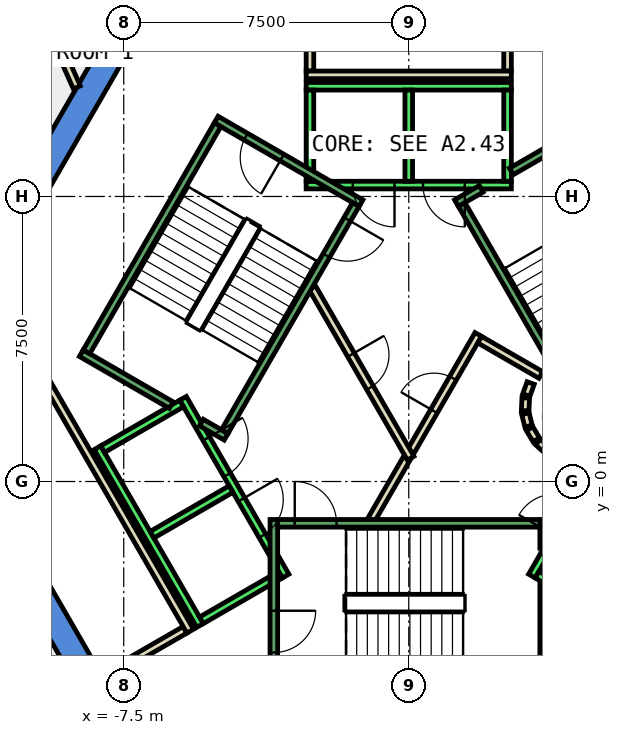
"""IFC4 building model, lengths in metres.
Left out: names, types, materials, properties, quantities, classifications, styles, units other than length and angle.
Written with IfcOpenShell. Run it as: python <this file> out.ifc"""

import sys

from ifc_helpers import new_model, si_unit, direction, frame, frame_2d, origin, place, context, subcontext, project, spatial, polyline, rectangle, outline, extrude, element, fill, save


model = new_model("IFC4")
c1 = context("Model", 3, precision=1e-05, world=origin(), true_north=direction((0.0, 1.0)))
c2 = subcontext(c1, "Body", "Model", "MODEL_VIEW")
j1 = project(units=[si_unit("LENGTHUNIT", "METRE"), si_unit("PLANEANGLEUNIT", "RADIAN")], contexts=[c1])
p1 = place(None, origin())
s1 = spatial("IfcSite", under=j1, at=p1, CompositionType="ELEMENT")
p2 = place(p1, origin())
s2 = spatial("IfcBuilding", under=s1, at=p2, CompositionType="ELEMENT")
p3 = place(p2, frame((0.0, 0.0, 210.8)))
s3 = spatial("IfcBuildingStorey", under=s2, at=p3, CompositionType="ELEMENT", Elevation=210.8)
p4 = place(p3, frame((0.0, 0.0, -0.4)))
e1 = element("IfcWall", 1, at=p4, inside=s3, PredefinedType="SHEAR", context=c2, shape_type="SweptSolid", body=[
    extrude(outline(polyline([(-11.834, 5.002), (-11.228, 4.652), (-6.235, 13.3), (-6.64, 14.0), (-11.834, 5.002)])), origin(), (0.0, 0.0, 1.0), 4.2),
])
p5 = place(p3, frame((0.0, 0.0, -0.4)))
e2 = element("IfcWall", 2, at=p5, inside=s3, PredefinedType="SHEAR", context=c2, shape_type="SweptSolid", body=[
    extrude(outline(polyline([(-13.279, 2.5), (-6.64, -9.0), (-6.235, -8.3), (-12.471, 2.5), (-13.279, 2.5)])), origin(), (0.0, 0.0, 1.0), 4.2),
])
p6 = place(p3, frame((-9.47, 12.033, 0.0), z_axis=(0.0, 0.0, 1.0), x_axis=(0.40441741061, -0.914574522931, 0.0)))
e3 = element("IfcWall", 3, at=p6, inside=s3, PredefinedType="PARTITIONING", context=c2, shape_type="SweptSolid", body=[
    extrude(rectangle(XDim=1.817, YDim=0.2, at=frame_2d((0.909, 0.0))), origin(), (0.0, 0.0, 1.0), 3.8),
])
p7 = place(p3, frame((-2.6, 10.8, 0.0), z_axis=(0.0, 0.0, 1.0), x_axis=(0.0, 1.0, 0.0)))
e4 = element("IfcWall", 4, at=p7, inside=s3, PredefinedType="PARTITIONING", context=c2, shape_type="SweptSolid", body=[
    extrude(rectangle(XDim=2.5, YDim=0.2, at=frame_2d((1.25, 0.0))), origin(), (0.0, 0.0, 1.0), 3.8),
])
p8 = place(p7, frame((0.75, 0.0, 0.0)))
e5 = element("IfcOpeningElement", 5, at=p8, cuts=e4, PredefinedType="OPENING", context=c2, shape_type="SweptSolid", body=[
    extrude(rectangle(XDim=0.9, YDim=2.1, at=frame_2d((0.45, 1.05))), frame((0.0, 0.11, 0.0), z_axis=(0.0, -1.0, 0.0), x_axis=(1.0, 0.0, 0.0)), (0.0, 0.0, 1.0), 0.22),
])
p9 = place(p3, frame((2.6, 13.3, 0.0), z_axis=(0.0, 0.0, 1.0), x_axis=(0.0, -1.0, 0.0)))
e6 = element("IfcWall", 6, at=p9, inside=s3, PredefinedType="PARTITIONING", context=c2, shape_type="SweptSolid", body=[
    extrude(rectangle(XDim=2.5, YDim=0.2, at=frame_2d((1.25, 0.0))), origin(), (0.0, 0.0, 1.0), 3.8),
])
p10 = place(p3, frame((2.7, 10.7, 0.0), z_axis=(0.0, 0.0, 1.0), x_axis=(-1.0, 0.0, 0.0)))
e7 = element("IfcWall", 7, at=p10, inside=s3, PredefinedType="PARTITIONING", context=c2, shape_type="SweptSolid", body=[
    extrude(rectangle(XDim=5.4, YDim=0.2, at=frame_2d((2.7, 0.0))), origin(), (0.0, 0.0, 1.0), 3.8),
])
p11 = place(p3, frame((-5.888, -3.902, 0.0), z_axis=(0.0, 0.0, 1.0), x_axis=(-0.866022959057, -0.500004234368, 0.0)))
e8 = element("IfcWall", 8, at=p11, inside=s3, PredefinedType="PARTITIONING", context=c2, shape_type="SweptSolid", body=[
    extrude(rectangle(XDim=2.5, YDim=0.2, at=frame_2d((1.25, 0.0))), origin(), (0.0, 0.0, 1.0), 3.8),
])
p12 = place(p3, frame((-9.751, 2.99, 0.0), z_axis=(0.0, 0.0, 1.0), x_axis=(0.500012163284, -0.866018381195, 0.0)))
e9 = element("IfcWall", 9, at=p12, inside=s3, PredefinedType="PARTITIONING", context=c2, shape_type="SweptSolid", body=[
    extrude(rectangle(XDim=8.0, YDim=0.2, at=frame_2d((4.0, 0.0))), origin(), (0.0, 0.0, 1.0), 3.8),
])
p13 = place(p3, frame((-0.982, -1.0, 0.0), z_axis=(0.0, 0.0, 1.0), x_axis=(0.50024047865, 0.865886518847, 0.0)))
e10 = element("IfcWall", 10, at=p13, inside=s3, PredefinedType="PARTITIONING", context=c2, shape_type="SweptSolid", body=[
    extrude(rectangle(XDim=1.863, YDim=0.2, at=frame_2d((0.931, 0.0))), origin(), (0.0, 0.0, 1.0), 3.8),
])
p14 = place(p3, frame((0.05, 0.787, 0.0), z_axis=(0.0, 0.0, 1.0), x_axis=(0.499954076797, 0.866051915934, 0.0)))
e11 = element("IfcWall", 11, at=p14, inside=s3, PredefinedType="PARTITIONING", context=c2, shape_type="SweptSolid", body=[
    extrude(rectangle(XDim=3.558, YDim=0.2, at=frame_2d((1.779, 0.0))), origin(), (0.0, 0.0, 1.0), 3.8),
])
p15 = place(p14, frame((1.229, 0.0, 0.0)))
e12 = element("IfcOpeningElement", 12, at=p15, cuts=e11, PredefinedType="OPENING", context=c2, shape_type="SweptSolid", body=[
    extrude(rectangle(XDim=1.0, YDim=2.1, at=frame_2d((0.5, 1.05))), frame((0.0, 0.11, 0.0), z_axis=(0.0, -1.0, 0.0), x_axis=(1.0, 0.0, 0.0)), (0.0, 0.0, 1.0), 0.22),
])
p16 = place(p3, frame((1.866, 3.732, 0.0), z_axis=(0.0, 0.0, 1.0), x_axis=(0.866043361281, -0.499968895414, 0.0)))
e13 = element("IfcWall", 13, at=p16, inside=s3, PredefinedType="PARTITIONING", context=c2, shape_type="SweptSolid", body=[
    extrude(rectangle(XDim=1.858, YDim=0.2, at=frame_2d((0.929, 0.0))), origin(), (0.0, 0.0, 1.0), 3.8),
])
p17 = place(p3, frame((3.208, 2.592, 0.0), z_axis=(0.0, 0.0, 1.0), x_axis=(-0.337388820924, -0.941365382578, 0.0)))
e14 = element("IfcWall", 14, at=p17, inside=s3, PredefinedType="PARTITIONING", context=c2, shape_type="SweptSolid", body=[
    extrude(rectangle(XDim=0.338, YDim=0.2, at=frame_2d((0.169, 0.0))), origin(), (0.0, 0.0, 1.0), 3.8),
])
p18 = place(p3, frame((3.079, 2.199, 0.0), z_axis=(0.0, 0.0, 1.0), x_axis=(-0.047771483479, -0.998858290933, 0.0)))
e15 = element("IfcWall", 15, at=p18, inside=s3, PredefinedType="PARTITIONING", context=c2, shape_type="SweptSolid", body=[
    extrude(rectangle(XDim=0.337, YDim=0.2, at=frame_2d((0.169, 0.0))), origin(), (0.0, 0.0, 1.0), 3.8),
])
p19 = place(p3, frame((3.07, 1.786, 0.0), z_axis=(0.0, 0.0, 1.0), x_axis=(0.242705583207, -0.970099994784, 0.0)))
e16 = element("IfcWall", 16, at=p19, inside=s3, PredefinedType="PARTITIONING", context=c2, shape_type="SweptSolid", body=[
    extrude(rectangle(XDim=0.338, YDim=0.2, at=frame_2d((0.169, 0.0))), origin(), (0.0, 0.0, 1.0), 3.8),
])
for number, where, z_axis, x_axis in (
    (17, (3.182, 1.388, 0.0), (0.0, 0.0, 1.0), (0.512, -0.859, 0.0)),
    (18, (3.404, 1.039, 0.0), (0.0, 0.0, 1.0), (0.74, -0.672, 0.0)),
):
    element("IfcWall", number, at=place(p3, frame(where, z_axis=z_axis, x_axis=x_axis)), inside=s3, PredefinedType="PARTITIONING", context=c2, shape_type="SweptSolid", body=[
        extrude(rectangle(XDim=0.338, YDim=0.2, at=frame_2d((0.169, 0.0))), origin(), (0.0, 0.0, 1.0), 3.8),
    ])
p20 = place(p3, frame((-2.54, 5.1, 0.0), z_axis=(0.0, 0.0, 1.0), x_axis=(0.499925051871, -0.866068670783, 0.0)))
e19 = element("IfcWall", 19, at=p20, inside=s3, PredefinedType="PARTITIONING", context=c2, shape_type="SweptSolid", body=[
    extrude(rectangle(XDim=5.181, YDim=0.2, at=frame_2d((2.59, 0.0))), origin(), (0.0, 0.0, 1.0), 3.8),
])
p21 = place(p20, frame((2.04, 0.0, 0.0)))
e20 = element("IfcOpeningElement", 20, at=p21, cuts=e19, PredefinedType="OPENING", context=c2, shape_type="SweptSolid", body=[
    extrude(rectangle(XDim=1.0, YDim=2.1, at=frame_2d((0.5, 1.05))), frame((0.0, 0.11, 0.0), z_axis=(0.0, -1.0, 0.0), x_axis=(1.0, 0.0, 0.0)), (0.0, 0.0, 1.0), 0.22),
])
p22 = place(p3, frame((2.7, 7.8, 0.0), z_axis=(0.0, 0.0, 1.0), x_axis=(-1.0, 0.0, 0.0)))
e21 = element("IfcWall", 21, at=p22, inside=s3, PredefinedType="STANDARD", context=c2, shape_type="SweptSolid", body=[
    extrude(rectangle(XDim=5.4, YDim=0.2, at=frame_2d((2.7, 0.0))), origin(), (0.0, 0.0, 1.0), 3.8),
])
p23 = place(p22, frame((1.225, 0.0, 0.0)))
e22 = element("IfcOpeningElement", 22, at=p23, cuts=e21, PredefinedType="OPENING", context=c2, shape_type="SweptSolid", body=[
    extrude(rectangle(XDim=1.1, YDim=2.1, at=frame_2d((0.55, 1.05))), frame((0.0, 0.11, 0.0), z_axis=(0.0, -1.0, 0.0), x_axis=(1.0, 0.0, 0.0)), (0.0, 0.0, 1.0), 0.22),
])
p24 = place(p22, frame((3.075, 0.0, 0.0)))
e23 = element("IfcOpeningElement", 23, at=p24, cuts=e21, PredefinedType="OPENING", context=c2, shape_type="SweptSolid", body=[
    extrude(rectangle(XDim=1.1, YDim=2.1, at=frame_2d((0.55, 1.05))), frame((0.0, 0.11, 0.0), z_axis=(0.0, -1.0, 0.0), x_axis=(1.0, 0.0, 0.0)), (0.0, 0.0, 1.0), 0.22),
])
p25 = place(p3, frame((2.7, 10.4, 0.0), z_axis=(0.0, 0.0, 1.0), x_axis=(-1.0, 0.0, 0.0)))
e24 = element("IfcWall", 24, at=p25, inside=s3, PredefinedType="STANDARD", context=c2, shape_type="SweptSolid", body=[
    extrude(rectangle(XDim=5.4, YDim=0.2, at=frame_2d((2.7, 0.0))), origin(), (0.0, 0.0, 1.0), 3.8),
])
for number, where, z_axis, x_axis in (
    (25, (2.6, 7.9, 0.0), (0.0, 0.0, 1.0), (0.0, 1.0, 0.0)),
    (26, (0.0, 7.9, 0.0), (0.0, 0.0, 1.0), (0.0, 1.0, 0.0)),
    (27, (-2.6, 7.9, 0.0), (0.0, 0.0, 1.0), (0.0, 1.0, 0.0)),
):
    element("IfcWall", number, at=place(p3, frame(where, z_axis=z_axis, x_axis=x_axis)), inside=s3, PredefinedType="STANDARD", context=c2, shape_type="SweptSolid", body=[
        extrude(rectangle(XDim=2.4, YDim=0.2, at=frame_2d((1.2, 0.0))), origin(), (0.0, 0.0, 1.0), 3.8),
    ])
p26 = place(p3, frame((-5.94, 2.188, 0.0), z_axis=(0.0, 0.0, 1.0), x_axis=(0.500034260056, -0.866005622828, 0.0)))
e28 = element("IfcWall", 28, at=p26, inside=s3, PredefinedType="STANDARD", context=c2, shape_type="SweptSolid", body=[
    extrude(rectangle(XDim=5.399, YDim=0.2, at=frame_2d((2.7, 0.0))), origin(), (0.0, 0.0, 1.0), 3.8),
])
p27 = place(p26, frame((3.075, 0.0, 0.0)))
e29 = element("IfcOpeningElement", 29, at=p27, cuts=e28, PredefinedType="OPENING", context=c2, shape_type="SweptSolid", body=[
    extrude(rectangle(XDim=1.1, YDim=2.1, at=frame_2d((0.55, 1.05))), frame((0.0, 0.11, 0.0), z_axis=(0.0, -1.0, 0.0), x_axis=(1.0, 0.0, 0.0)), (0.0, 0.0, 1.0), 0.22),
])
p28 = place(p26, frame((1.225, 0.0, 0.0)))
e30 = element("IfcOpeningElement", 30, at=p28, cuts=e28, PredefinedType="OPENING", context=c2, shape_type="SweptSolid", body=[
    extrude(rectangle(XDim=1.1, YDim=2.1, at=frame_2d((0.55, 1.05))), frame((0.0, 0.11, 0.0), z_axis=(0.0, -1.0, 0.0), x_axis=(1.0, 0.0, 0.0)), (0.0, 0.0, 1.0), 0.22),
])
p29 = place(p3, frame((-8.192, 0.888, 0.0), z_axis=(0.0, 0.0, 1.0), x_axis=(0.500034260056, -0.866005622828, 0.0)))
e31 = element("IfcWall", 31, at=p29, inside=s3, PredefinedType="STANDARD", context=c2, shape_type="SweptSolid", body=[
    extrude(rectangle(XDim=5.399, YDim=0.2, at=frame_2d((2.7, 0.0))), origin(), (0.0, 0.0, 1.0), 3.8),
])
for number, where, z_axis, x_axis in (
    (32, (-5.977, 2.052, 0.0), (0.0, 0.0, 1.0), (-0.866, -0.5, 0.0)),
    (33, (-4.677, -0.2, 0.0), (0.0, 0.0, 1.0), (-0.866, -0.5, 0.0)),
):
    element("IfcWall", number, at=place(p3, frame(where, z_axis=z_axis, x_axis=x_axis)), inside=s3, PredefinedType="STANDARD", context=c2, shape_type="SweptSolid", body=[
        extrude(rectangle(XDim=2.399, YDim=0.2, at=frame_2d((1.2, 0.0))), origin(), (0.0, 0.0, 1.0), 3.8),
    ])
p30 = place(p3, frame((-3.377, -2.452, 0.0), z_axis=(0.0, 0.0, 1.0), x_axis=(-0.865955154139, -0.50012165622, 0.0)))
e34 = element("IfcWall", 34, at=p30, inside=s3, PredefinedType="STANDARD", context=c2, shape_type="SweptSolid", body=[
    extrude(rectangle(XDim=2.4, YDim=0.2, at=frame_2d((1.2, 0.0))), origin(), (0.0, 0.0, 1.0), 3.8),
])
p31 = place(p3, frame((3.24, -2.488, 0.0), z_axis=(0.0, 0.0, 1.0), x_axis=(0.500034260056, 0.866005622828, 0.0)))
e35 = element("IfcWall", 35, at=p31, inside=s3, PredefinedType="STANDARD", context=c2, shape_type="SweptSolid", body=[
    extrude(rectangle(XDim=5.399, YDim=0.2, at=frame_2d((2.7, 0.0))), origin(), (0.0, 0.0, 1.0), 3.8),
])
p32 = place(p31, frame((3.225, 0.0, 0.0)))
e36 = element("IfcOpeningElement", 36, at=p32, cuts=e35, PredefinedType="OPENING", context=c2, shape_type="SweptSolid", body=[
    extrude(rectangle(XDim=1.1, YDim=2.1, at=frame_2d((0.55, 1.05))), frame((0.0, 0.11, 0.0), z_axis=(0.0, -1.0, 0.0), x_axis=(1.0, 0.0, 0.0)), (0.0, 0.0, 1.0), 0.22),
])
p33 = place(p31, frame((1.225, 0.0, 0.0)))
e37 = element("IfcOpeningElement", 37, at=p33, cuts=e35, PredefinedType="OPENING", context=c2, shape_type="SweptSolid", body=[
    extrude(rectangle(XDim=1.1, YDim=2.1, at=frame_2d((0.55, 1.05))), frame((0.0, 0.11, 0.0), z_axis=(0.0, -1.0, 0.0), x_axis=(1.0, 0.0, 0.0)), (0.0, 0.0, 1.0), 0.22),
])
p34 = place(p3, frame((3.377, -2.452, 0.0), z_axis=(0.0, 0.0, 1.0), x_axis=(0.865955154139, -0.50012165622, 0.0)))
e38 = element("IfcWall", 38, at=p34, inside=s3, PredefinedType="STANDARD", context=c2, shape_type="SweptSolid", body=[
    extrude(rectangle(XDim=2.4, YDim=0.2, at=frame_2d((1.2, 0.0))), origin(), (0.0, 0.0, 1.0), 3.8),
])
p35 = place(p3, frame((-3.55, -1.0, 0.0), z_axis=(0.0, 0.0, 1.0), x_axis=(0.0, -1.0, 0.0)))
e39 = element("IfcWall", 39, at=p35, inside=s3, PredefinedType="STANDARD", context=c2, shape_type="SweptSolid", body=[
    extrude(rectangle(XDim=4.4, YDim=0.2, at=frame_2d((2.2, 0.0))), origin(), (0.0, 0.0, 1.0), 3.8),
])
p36 = place(p35, frame((2.4, 0.0, 0.0)))
e40 = element("IfcOpeningElement", 40, at=p36, cuts=e39, PredefinedType="OPENING", context=c2, shape_type="SweptSolid", body=[
    extrude(rectangle(XDim=1.1, YDim=2.2, at=frame_2d((0.55, 1.1))), frame((0.0, 0.11, 0.0), z_axis=(0.0, -1.0, 0.0), x_axis=(1.0, 0.0, 0.0)), (0.0, 0.0, 1.0), 0.22),
])
p37 = place(p3, frame((3.55, -2.667, 0.0), z_axis=(0.0, 0.0, 1.0), x_axis=(0.0, -1.0, 0.0)))
e41 = element("IfcWall", 41, at=p37, inside=s3, PredefinedType="STANDARD", context=c2, shape_type="SweptSolid", body=[
    extrude(rectangle(XDim=2.733, YDim=0.2, at=frame_2d((1.366, 0.0))), origin(), (0.0, 0.0, 1.0), 3.8),
])
p38 = place(p3, frame((3.55, -1.0, 0.0), z_axis=(0.0, 0.0, 1.0), x_axis=(0.0, -1.0, 0.0)))
e42 = element("IfcWall", 42, at=p38, inside=s3, PredefinedType="STANDARD", context=c2, shape_type="SweptSolid", body=[
    extrude(rectangle(XDim=0.751, YDim=0.2, at=frame_2d((0.375, 0.0))), origin(), (0.0, 0.0, 1.0), 3.8),
])
p39 = place(p3, frame((-3.45, -1.1, 0.0), z_axis=(0.0, 0.0, 1.0), x_axis=(1.0, 0.0, 0.0)))
e43 = element("IfcWall", 43, at=p39, inside=s3, PredefinedType="STANDARD", context=c2, shape_type="SweptSolid", body=[
    extrude(rectangle(XDim=6.9, YDim=0.2, at=frame_2d((3.45, 0.0))), origin(), (0.0, 0.0, 1.0), 3.8),
])
p40 = place(p39, frame((0.45, 0.0, 0.0)))
e44 = element("IfcOpeningElement", 44, at=p40, cuts=e43, PredefinedType="OPENING", context=c2, shape_type="SweptSolid", body=[
    extrude(rectangle(XDim=1.1, YDim=2.2, at=frame_2d((0.55, 1.1))), frame((0.0, 0.11, 0.0), z_axis=(0.0, -1.0, 0.0), x_axis=(1.0, 0.0, 0.0)), (0.0, 0.0, 1.0), 0.22),
])
p41 = place(p3, frame((2.7, 8.158, 0.0), z_axis=(0.0, 0.0, 1.0), x_axis=(0.86611865017, 0.499838457731, 0.0)))
e45 = element("IfcWall", 45, at=p41, inside=s3, PredefinedType="STANDARD", context=c2, shape_type="SweptSolid", body=[
    extrude(rectangle(XDim=2.733, YDim=0.2, at=frame_2d((1.366, 0.0))), origin(), (0.0, 0.0, 1.0), 3.8),
])
p42 = place(p3, frame((1.256, 7.324, 0.0), z_axis=(0.0, 0.0, 1.0), x_axis=(0.865915093549, 0.500191014278, 0.0)))
e46 = element("IfcWall", 46, at=p42, inside=s3, PredefinedType="STANDARD", context=c2, shape_type="SweptSolid", body=[
    extrude(rectangle(XDim=0.752, YDim=0.2, at=frame_2d((0.376, 0.0))), origin(), (0.0, 0.0, 1.0), 3.8),
])
p43 = place(p3, frame((4.843, 1.312, 0.0), z_axis=(0.0, 0.0, 1.0), x_axis=(-0.499963383562, 0.866046543262, 0.0)))
e47 = element("IfcWall", 47, at=p43, inside=s3, PredefinedType="STANDARD", context=c2, shape_type="SweptSolid", body=[
    extrude(rectangle(XDim=6.9, YDim=0.2, at=frame_2d((3.45, 0.0))), origin(), (0.0, 0.0, 1.0), 3.8),
])
p44 = place(p43, frame((0.45, 0.0, 0.0)))
e48 = element("IfcOpeningElement", 48, at=p44, cuts=e47, PredefinedType="OPENING", context=c2, shape_type="SweptSolid", body=[
    extrude(rectangle(XDim=1.1, YDim=2.2, at=frame_2d((0.55, 1.1))), frame((0.0, 0.11, 0.0), z_axis=(0.0, -1.0, 0.0), x_axis=(1.0, 0.0, 0.0)), (0.0, 0.0, 1.0), 0.22),
])
p45 = place(p3, frame((-1.256, 7.324, 0.0), z_axis=(0.0, 0.0, 1.0), x_axis=(-0.866046073146, 0.499964197906, 0.0)))
e49 = element("IfcWall", 49, at=p45, inside=s3, PredefinedType="STANDARD", context=c2, shape_type="SweptSolid", body=[
    extrude(rectangle(XDim=4.4, YDim=0.2, at=frame_2d((2.2, 0.0))), origin(), (0.0, 0.0, 1.0), 3.8),
])
p46 = place(p45, frame((2.4, 0.0, 0.0)))
e50 = element("IfcOpeningElement", 50, at=p46, cuts=e49, PredefinedType="OPENING", context=c2, shape_type="SweptSolid", body=[
    extrude(rectangle(XDim=1.1, YDim=2.2, at=frame_2d((0.55, 1.1))), frame((0.0, 0.11, 0.0), z_axis=(0.0, -1.0, 0.0), x_axis=(1.0, 0.0, 0.0)), (0.0, 0.0, 1.0), 0.22),
])
p47 = place(p3, frame((-6.25, 2.01, 0.0), z_axis=(0.0, 0.0, 1.0), x_axis=(-0.86611865017, 0.499838457731, 0.0)))
e51 = element("IfcWall", 51, at=p47, inside=s3, PredefinedType="STANDARD", context=c2, shape_type="SweptSolid", body=[
    extrude(rectangle(XDim=2.733, YDim=0.2, at=frame_2d((1.366, 0.0))), origin(), (0.0, 0.0, 1.0), 3.8),
])
p48 = place(p3, frame((-4.806, 1.176, 0.0), z_axis=(0.0, 0.0, 1.0), x_axis=(-0.866558586415, 0.499075361355, 0.0)))
e52 = element("IfcWall", 52, at=p48, inside=s3, PredefinedType="STANDARD", context=c2, shape_type="SweptSolid", body=[
    extrude(rectangle(XDim=0.751, YDim=0.2, at=frame_2d((0.376, 0.0))), origin(), (0.0, 0.0, 1.0), 3.8),
])
p49 = place(p3, frame((-1.393, 7.288, 0.0), z_axis=(0.0, 0.0, 1.0), x_axis=(-0.499963383562, -0.866046543262, 0.0)))
e53 = element("IfcWall", 53, at=p49, inside=s3, PredefinedType="STANDARD", context=c2, shape_type="SweptSolid", body=[
    extrude(rectangle(XDim=6.9, YDim=0.2, at=frame_2d((3.45, 0.0))), origin(), (0.0, 0.0, 1.0), 3.8),
])
p50 = place(p49, frame((0.45, 0.0, 0.0)))
e54 = element("IfcOpeningElement", 54, at=p50, cuts=e53, PredefinedType="OPENING", context=c2, shape_type="SweptSolid", body=[
    extrude(rectangle(XDim=1.1, YDim=2.2, at=frame_2d((0.55, 1.1))), frame((0.0, 0.11, 0.0), z_axis=(0.0, -1.0, 0.0), x_axis=(1.0, 0.0, 0.0)), (0.0, 0.0, 1.0), 0.22),
])
p51 = place(p3, frame((-5.03, 9.388, 0.0), z_axis=(0.0, 0.0, 1.0), x_axis=(-0.499978703459, -0.866037698999, 0.0)))
e55 = element("IfcWall", 55, at=p51, inside=s3, PredefinedType="STANDARD", context=c2, shape_type="SweptSolid", body=[
    extrude(rectangle(XDim=6.9, YDim=0.2, at=frame_2d((3.45, 0.0))), origin(), (0.0, 0.0, 1.0), 3.8),
])
p52 = place(p15, origin())
e56 = element("IfcDoor", 56, at=p52, inside=s3, OperationType="SINGLE_SWING_RIGHT", PredefinedType="DOOR", context=c2, shape_type="SweptSolid", body=[
    extrude(rectangle(XDim=1.0, YDim=2.1, at=frame_2d((0.5, 1.05))), frame((0.0, 0.025, 0.0), z_axis=(0.0, -1.0, 0.0), x_axis=(1.0, 0.0, 0.0)), (0.0, 0.0, 1.0), 0.05),
])
fill(e12, e56)
p53 = place(p21, origin())
e57 = element("IfcDoor", 57, at=p53, inside=s3, OperationType="SINGLE_SWING_RIGHT", PredefinedType="DOOR", context=c2, shape_type="SweptSolid", body=[
    extrude(rectangle(XDim=1.0, YDim=2.1, at=frame_2d((0.5, 1.05))), frame((0.0, 0.025, 0.0), z_axis=(0.0, -1.0, 0.0), x_axis=(1.0, 0.0, 0.0)), (0.0, 0.0, 1.0), 0.05),
])
fill(e20, e57)
p54 = place(p23, origin())
e58 = element("IfcDoor", 58, at=p54, inside=s3, OperationType="SLIDING_TO_LEFT", PredefinedType="DOOR", context=c2, shape_type="SweptSolid", body=[
    extrude(rectangle(XDim=1.1, YDim=2.1, at=frame_2d((0.55, 1.05))), frame((0.0, 0.025, 0.0), z_axis=(0.0, -1.0, 0.0), x_axis=(1.0, 0.0, 0.0)), (0.0, 0.0, 1.0), 0.05),
])
fill(e22, e58)
p55 = place(p24, origin())
e59 = element("IfcDoor", 59, at=p55, inside=s3, OperationType="SLIDING_TO_LEFT", PredefinedType="DOOR", context=c2, shape_type="SweptSolid", body=[
    extrude(rectangle(XDim=1.1, YDim=2.1, at=frame_2d((0.55, 1.05))), frame((0.0, 0.025, 0.0), z_axis=(0.0, -1.0, 0.0), x_axis=(1.0, 0.0, 0.0)), (0.0, 0.0, 1.0), 0.05),
])
fill(e23, e59)
p56 = place(p27, origin())
e60 = element("IfcDoor", 60, at=p56, inside=s3, OperationType="SLIDING_TO_LEFT", PredefinedType="DOOR", context=c2, shape_type="SweptSolid", body=[
    extrude(rectangle(XDim=1.1, YDim=2.1, at=frame_2d((0.55, 1.05))), frame((0.0, 0.025, 0.0), z_axis=(0.0, -1.0, 0.0), x_axis=(1.0, 0.0, 0.0)), (0.0, 0.0, 1.0), 0.05),
])
fill(e29, e60)
p57 = place(p28, origin())
e61 = element("IfcDoor", 61, at=p57, inside=s3, OperationType="SLIDING_TO_LEFT", PredefinedType="DOOR", context=c2, shape_type="SweptSolid", body=[
    extrude(rectangle(XDim=1.1, YDim=2.1, at=frame_2d((0.55, 1.05))), frame((0.0, 0.025, 0.0), z_axis=(0.0, -1.0, 0.0), x_axis=(1.0, 0.0, 0.0)), (0.0, 0.0, 1.0), 0.05),
])
fill(e30, e61)
p58 = place(p40, origin())
e62 = element("IfcDoor", 62, at=p58, inside=s3, OperationType="SINGLE_SWING_LEFT", PredefinedType="DOOR", context=c2, shape_type="SweptSolid", body=[
    extrude(rectangle(XDim=1.1, YDim=2.2, at=frame_2d((0.55, 1.1))), frame((0.0, 0.025, 0.0), z_axis=(0.0, -1.0, 0.0), x_axis=(1.0, 0.0, 0.0)), (0.0, 0.0, 1.0), 0.05),
])
fill(e44, e62)
p59 = place(p36, origin())
e63 = element("IfcDoor", 63, at=p59, inside=s3, OperationType="SINGLE_SWING_LEFT", PredefinedType="DOOR", context=c2, shape_type="SweptSolid", body=[
    extrude(rectangle(XDim=1.1, YDim=2.2, at=frame_2d((0.55, 1.1))), frame((0.0, 0.025, 0.0), z_axis=(0.0, -1.0, 0.0), x_axis=(1.0, 0.0, 0.0)), (0.0, 0.0, 1.0), 0.05),
])
fill(e40, e63)
p60 = place(p50, origin())
e64 = element("IfcDoor", 64, at=p60, inside=s3, OperationType="SINGLE_SWING_LEFT", PredefinedType="DOOR", context=c2, shape_type="SweptSolid", body=[
    extrude(rectangle(XDim=1.1, YDim=2.2, at=frame_2d((0.55, 1.1))), frame((0.0, 0.025, 0.0), z_axis=(0.0, -1.0, 0.0), x_axis=(1.0, 0.0, 0.0)), (0.0, 0.0, 1.0), 0.05),
])
fill(e54, e64)
p61 = place(p46, origin())
e65 = element("IfcDoor", 65, at=p61, inside=s3, OperationType="SINGLE_SWING_LEFT", PredefinedType="DOOR", context=c2, shape_type="SweptSolid", body=[
    extrude(rectangle(XDim=1.1, YDim=2.2, at=frame_2d((0.55, 1.1))), frame((0.0, 0.025, 0.0), z_axis=(0.0, -1.0, 0.0), x_axis=(1.0, 0.0, 0.0)), (0.0, 0.0, 1.0), 0.05),
])
fill(e50, e65)
save(model, sys.argv[1])
